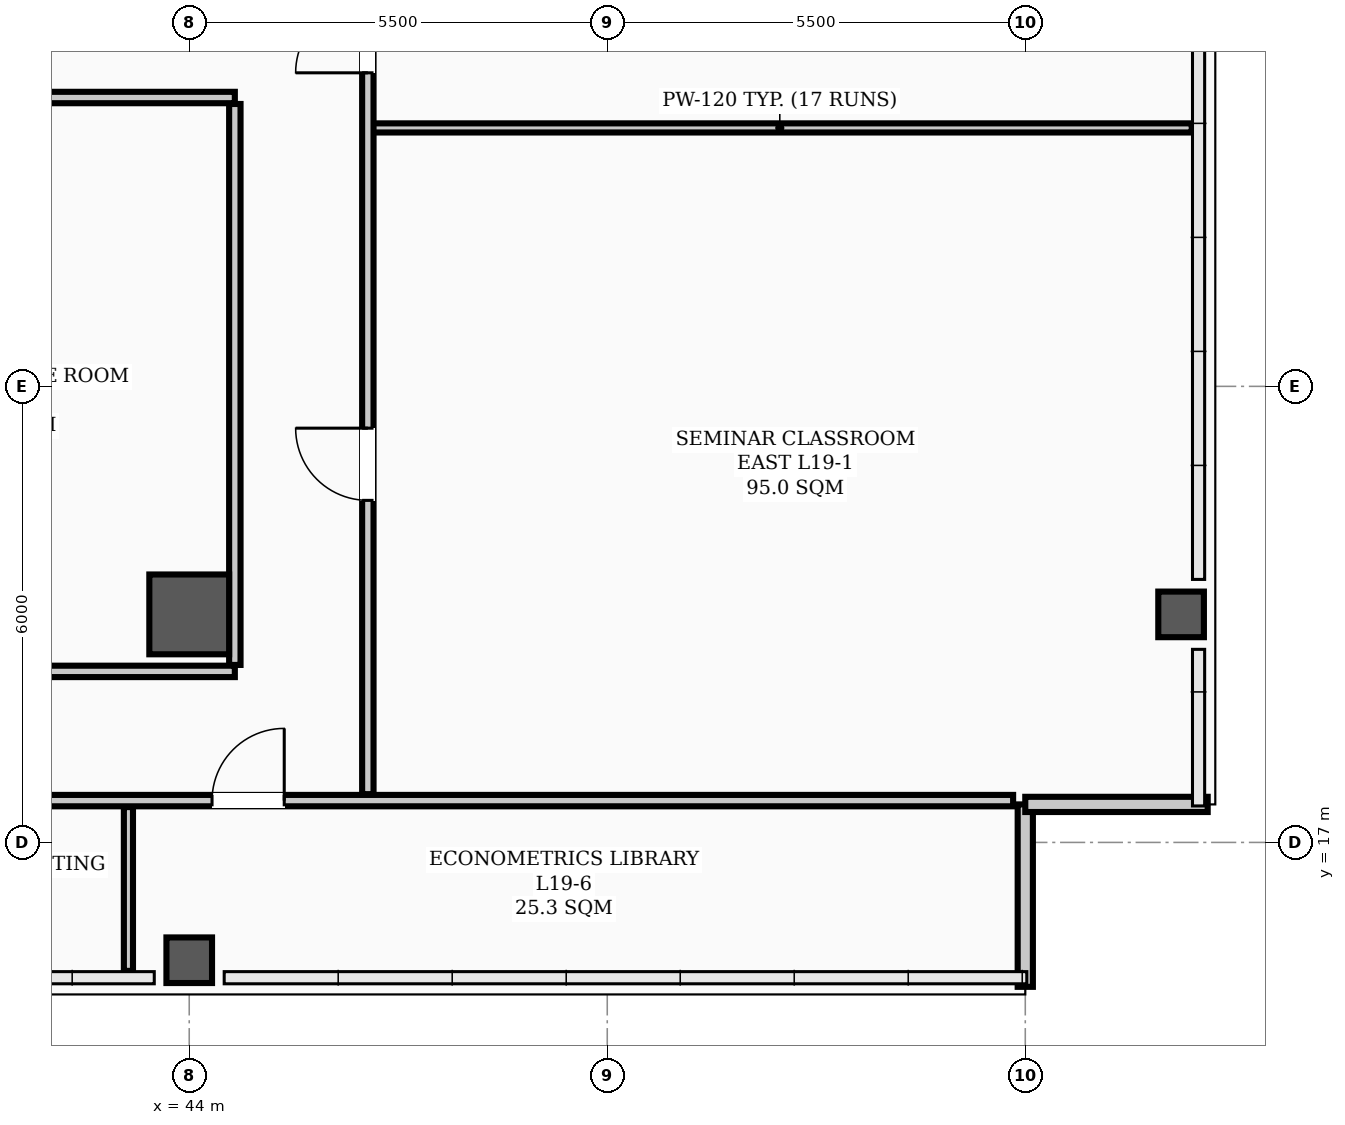
"""IFC4 building model, lengths in metres.
Left out: names, types, materials, properties, quantities, classifications, styles, units other than length and angle.
Written with IfcOpenShell. Run it as: python <this file> out.ifc"""

import sys

from ifc_helpers import new_model, si_unit, direction, frame, frame_2d, origin, origin_2d, place, context, subcontext, project, spatial, rectangle, hollow_rectangle, extrude, element, fill, save


model = new_model("IFC4")
c1 = context("Model", 3, precision=1e-05, world=origin(), true_north=direction((0.0, 1.0)))
c2 = subcontext(c1, "Body", "Model", "MODEL_VIEW")
j1 = project(units=[si_unit("LENGTHUNIT", "METRE"), si_unit("PLANEANGLEUNIT", "RADIAN")], contexts=[c1])
p1 = place(None, origin())
s1 = spatial("IfcSite", under=j1, at=p1, CompositionType="ELEMENT")
p2 = place(p1, origin())
s2 = spatial("IfcBuilding", under=s1, at=p2, CompositionType="ELEMENT")
p3 = place(p2, frame((0.0, 0.0, 77.2)))
s3 = spatial("IfcBuildingStorey", under=s2, at=p3, CompositionType="ELEMENT", Elevation=77.2)
p4 = place(p3, frame((44.0, 20.0, 0.0), z_axis=(0.0, 0.0, 1.0), x_axis=(1.0, 0.0, 0.0)))
e1 = element("IfcColumn", 1, at=p4, inside=s3, PredefinedType="COLUMN", context=c2, shape_type="SweptSolid", body=[
    extrude(hollow_rectangle(XDim=1.05, YDim=1.05, WallThickness=0.038, InnerFilletRadius=0.019, OuterFilletRadius=0.057, at=origin_2d()), origin(), (0.0, 0.0, 1.0), 3.9),
])
for number, where, z_axis, x_axis in (
    (2, (44.0, 15.45, 0.0), (0.0, 0.0, 1.0), (1.0, 0.0, 0.0)),
    (3, (57.05, 20.0, 0.0), (0.0, 0.0, 1.0), (1.0, 0.0, 0.0)),
):
    element("IfcColumn", number, at=place(p3, frame(where, z_axis=z_axis, x_axis=x_axis)), inside=s3, PredefinedType="COLUMN", context=c2, shape_type="SweptSolid", body=[
        extrude(hollow_rectangle(XDim=0.6, YDim=0.6, WallThickness=0.026, InnerFilletRadius=0.013, OuterFilletRadius=0.039, at=origin_2d()), origin(), (0.0, 0.0, 1.0), 3.9),
    ])
for number, where, z_axis, x_axis in (
    (4, (55.0, 15.1, 0.0), (0.0, 0.0, 1.0), (0.0, 1.0, 0.0)),
    (5, (55.0, 17.5, 0.0), (0.0, 0.0, 1.0), (1.0, 0.0, 0.0)),
):
    element("IfcWall", number, at=place(p3, frame(where, z_axis=z_axis, x_axis=x_axis)), inside=s3, PredefinedType="PARAPET", context=c2, shape_type="SweptSolid", body=[
        extrude(rectangle(XDim=2.4, YDim=0.2, at=frame_2d((1.2, 0.0))), origin(), (0.0, 0.0, 1.0), 1.2),
    ])
p5 = place(p3, frame((12.9, 26.8, 0.0), z_axis=(0.0, 0.0, 1.0), x_axis=(1.0, 0.0, 0.0)))
e6 = element("IfcWall", 6, at=p5, inside=s3, PredefinedType="PARTITIONING", context=c2, shape_type="SweptSolid", body=[
    extrude(rectangle(XDim=31.7, YDim=0.15, at=frame_2d((15.85, 0.0))), origin(), (0.0, 0.0, 1.0), 2.24),
])
p6 = place(p5, frame((13.6, 0.0, 0.0)))
e7 = element("IfcOpeningElement", 7, at=p6, cuts=e6, PredefinedType="OPENING", context=c2, shape_type="SweptSolid", body=[
    extrude(rectangle(XDim=1.6, YDim=2.08, at=frame_2d((0.8, 1.04))), frame((0.0, 0.085, 0.0), z_axis=(0.0, -1.0, 0.0), x_axis=(1.0, 0.0, 0.0)), (0.0, 0.0, 1.0), 0.17),
])
p7 = place(p5, frame((1.875, 0.0, 0.0)))
e8 = element("IfcOpeningElement", 8, at=p7, cuts=e6, PredefinedType="OPENING", context=c2, shape_type="SweptSolid", body=[
    extrude(rectangle(XDim=0.95, YDim=2.08, at=frame_2d((0.475, 1.04))), frame((0.0, 0.085, 0.0), z_axis=(0.0, -1.0, 0.0), x_axis=(1.0, 0.0, 0.0)), (0.0, 0.0, 1.0), 0.17),
])
p8 = place(p5, frame((6.425, 0.0, 0.0)))
e9 = element("IfcOpeningElement", 9, at=p8, cuts=e6, PredefinedType="OPENING", context=c2, shape_type="SweptSolid", body=[
    extrude(rectangle(XDim=0.95, YDim=2.08, at=frame_2d((0.475, 1.04))), frame((0.0, 0.085, 0.0), z_axis=(0.0, -1.0, 0.0), x_axis=(1.0, 0.0, 0.0)), (0.0, 0.0, 1.0), 0.17),
])
p9 = place(p5, frame((10.725, 0.0, 0.0)))
e10 = element("IfcOpeningElement", 10, at=p9, cuts=e6, PredefinedType="OPENING", context=c2, shape_type="SweptSolid", body=[
    extrude(rectangle(XDim=0.95, YDim=2.08, at=frame_2d((0.475, 1.04))), frame((0.0, 0.085, 0.0), z_axis=(0.0, -1.0, 0.0), x_axis=(1.0, 0.0, 0.0)), (0.0, 0.0, 1.0), 0.17),
])
p10 = place(p5, frame((16.075, 0.0, 0.0)))
e11 = element("IfcOpeningElement", 11, at=p10, cuts=e6, PredefinedType="OPENING", context=c2, shape_type="SweptSolid", body=[
    extrude(rectangle(XDim=0.95, YDim=2.08, at=frame_2d((0.475, 1.04))), frame((0.0, 0.085, 0.0), z_axis=(0.0, -1.0, 0.0), x_axis=(1.0, 0.0, 0.0)), (0.0, 0.0, 1.0), 0.17),
])
p11 = place(p5, frame((22.225, 0.0, 0.0)))
e12 = element("IfcOpeningElement", 12, at=p11, cuts=e6, PredefinedType="OPENING", context=c2, shape_type="SweptSolid", body=[
    extrude(rectangle(XDim=0.95, YDim=2.08, at=frame_2d((0.475, 1.04))), frame((0.0, 0.085, 0.0), z_axis=(0.0, -1.0, 0.0), x_axis=(1.0, 0.0, 0.0)), (0.0, 0.0, 1.0), 0.17),
])
p12 = place(p5, frame((28.225, 0.0, 0.0)))
e13 = element("IfcOpeningElement", 13, at=p12, cuts=e6, PredefinedType="OPENING", context=c2, shape_type="SweptSolid", body=[
    extrude(rectangle(XDim=0.95, YDim=2.08, at=frame_2d((0.475, 1.04))), frame((0.0, 0.085, 0.0), z_axis=(0.0, -1.0, 0.0), x_axis=(1.0, 0.0, 0.0)), (0.0, 0.0, 1.0), 0.17),
])
p13 = place(p3, frame((10.16, 17.55, 0.0), z_axis=(0.0, 0.0, 1.0), x_axis=(1.0, 0.0, 0.0)))
e14 = element("IfcWall", 14, at=p13, inside=s3, PredefinedType="PARTITIONING", context=c2, shape_type="SweptSolid", body=[
    extrude(rectangle(XDim=44.68, YDim=0.15, at=frame_2d((22.34, 0.0))), origin(), (0.0, 0.0, 1.0), 2.24),
])
p14 = place(p13, frame((5.465, 0.0, 0.0)))
e15 = element("IfcOpeningElement", 15, at=p14, cuts=e14, PredefinedType="OPENING", context=c2, shape_type="SweptSolid", body=[
    extrude(rectangle(XDim=0.95, YDim=2.08, at=frame_2d((0.475, 1.04))), frame((0.0, 0.085, 0.0), z_axis=(0.0, -1.0, 0.0), x_axis=(1.0, 0.0, 0.0)), (0.0, 0.0, 1.0), 0.17),
])
p15 = place(p13, frame((11.465, 0.0, 0.0)))
e16 = element("IfcOpeningElement", 16, at=p15, cuts=e14, PredefinedType="OPENING", context=c2, shape_type="SweptSolid", body=[
    extrude(rectangle(XDim=0.95, YDim=2.08, at=frame_2d((0.475, 1.04))), frame((0.0, 0.085, 0.0), z_axis=(0.0, -1.0, 0.0), x_axis=(1.0, 0.0, 0.0)), (0.0, 0.0, 1.0), 0.17),
])
p16 = place(p13, frame((28.565, 0.0, 0.0)))
e17 = element("IfcOpeningElement", 17, at=p16, cuts=e14, PredefinedType="OPENING", context=c2, shape_type="SweptSolid", body=[
    extrude(rectangle(XDim=0.95, YDim=2.08, at=frame_2d((0.475, 1.04))), frame((0.0, 0.085, 0.0), z_axis=(0.0, -1.0, 0.0), x_axis=(1.0, 0.0, 0.0)), (0.0, 0.0, 1.0), 0.17),
])
p17 = place(p13, frame((34.14, 0.0, 0.0)))
e18 = element("IfcOpeningElement", 18, at=p17, cuts=e14, PredefinedType="OPENING", context=c2, shape_type="SweptSolid", body=[
    extrude(rectangle(XDim=0.95, YDim=2.08, at=frame_2d((0.475, 1.04))), frame((0.0, 0.085, 0.0), z_axis=(0.0, -1.0, 0.0), x_axis=(1.0, 0.0, 0.0)), (0.0, 0.0, 1.0), 0.17),
])
p18 = place(p3, frame((28.4, 19.25, 0.0), z_axis=(0.0, 0.0, 1.0), x_axis=(1.0, 0.0, 0.0)))
e19 = element("IfcWall", 19, at=p18, inside=s3, PredefinedType="PARTITIONING", context=c2, shape_type="SweptSolid", body=[
    extrude(rectangle(XDim=16.2, YDim=0.15, at=frame_2d((8.1, 0.0))), origin(), (0.0, 0.0, 1.0), 2.24),
])
p19 = place(p3, frame((46.35, 26.4, 0.0), z_axis=(0.0, 0.0, 1.0), x_axis=(1.0, 0.0, 0.0)))
e20 = element("IfcWall", 20, at=p19, inside=s3, PredefinedType="PARTITIONING", context=c2, shape_type="SweptSolid", body=[
    extrude(rectangle(XDim=10.84, YDim=0.12, at=frame_2d((5.42, 0.0))), origin(), (0.0, 0.0, 1.0), 2.24),
])
p20 = place(p3, frame((46.35, 17.635, 0.0), z_axis=(0.0, 0.0, 1.0), x_axis=(0.0, 1.0, 0.0)))
e21 = element("IfcWall", 21, at=p20, inside=s3, PredefinedType="PARTITIONING", context=c2, shape_type="SweptSolid", body=[
    extrude(rectangle(XDim=22.53, YDim=0.15, at=frame_2d((11.265, 0.0))), origin(), (0.0, 0.0, 1.0), 2.24),
])
p21 = place(p20, frame((3.865, 0.0, 0.0)))
e22 = element("IfcOpeningElement", 22, at=p21, cuts=e21, PredefinedType="OPENING", context=c2, shape_type="SweptSolid", body=[
    extrude(rectangle(XDim=0.95, YDim=2.08, at=frame_2d((0.475, 1.04))), frame((0.0, 0.085, 0.0), z_axis=(0.0, -1.0, 0.0), x_axis=(1.0, 0.0, 0.0)), (0.0, 0.0, 1.0), 0.17),
])
p22 = place(p20, frame((9.49, 0.0, 0.0)))
e23 = element("IfcOpeningElement", 23, at=p22, cuts=e21, PredefinedType="OPENING", context=c2, shape_type="SweptSolid", body=[
    extrude(rectangle(XDim=0.95, YDim=2.08, at=frame_2d((0.475, 1.04))), frame((0.0, 0.085, 0.0), z_axis=(0.0, -1.0, 0.0), x_axis=(1.0, 0.0, 0.0)), (0.0, 0.0, 1.0), 0.17),
])
p23 = place(p20, frame((18.415, 0.0, 0.0)))
e24 = element("IfcOpeningElement", 24, at=p23, cuts=e21, PredefinedType="OPENING", context=c2, shape_type="SweptSolid", body=[
    extrude(rectangle(XDim=0.95, YDim=2.08, at=frame_2d((0.475, 1.04))), frame((0.0, 0.085, 0.0), z_axis=(0.0, -1.0, 0.0), x_axis=(1.0, 0.0, 0.0)), (0.0, 0.0, 1.0), 0.17),
])
p24 = place(p3, frame((44.6, 19.335, 0.0), z_axis=(0.0, 0.0, 1.0), x_axis=(0.0, 1.0, 0.0)))
e25 = element("IfcWall", 25, at=p24, inside=s3, PredefinedType="PARTITIONING", context=c2, shape_type="SweptSolid", body=[
    extrude(rectangle(XDim=7.38, YDim=0.15, at=frame_2d((3.69, 0.0))), origin(), (0.0, 0.0, 1.0), 2.24),
])
p25 = place(p3, frame((43.2, 15.31, 0.0), z_axis=(0.0, 0.0, 1.0), x_axis=(0.0, 1.0, 0.0)))
e26 = element("IfcWall", 26, at=p25, inside=s3, PredefinedType="PARTITIONING", context=c2, shape_type="SweptSolid", body=[
    extrude(rectangle(XDim=2.155, YDim=0.12, at=frame_2d((1.078, 0.0))), origin(), (0.0, 0.0, 1.0), 3.24),
])
p26 = place(p17, origin())
e27 = element("IfcDoor", 27, at=p26, inside=s3, OperationType="SINGLE_SWING_RIGHT", PredefinedType="DOOR", context=c2, shape_type="SweptSolid", body=[
    extrude(rectangle(XDim=0.95, YDim=2.08, at=frame_2d((0.475, 1.04))), frame((0.0, 0.025, 0.0), z_axis=(0.0, -1.0, 0.0), x_axis=(1.0, 0.0, 0.0)), (0.0, 0.0, 1.0), 0.05),
])
fill(e18, e27)
p27 = place(p21, origin())
e28 = element("IfcDoor", 28, at=p27, inside=s3, OperationType="SINGLE_SWING_RIGHT", PredefinedType="DOOR", context=c2, shape_type="SweptSolid", body=[
    extrude(rectangle(XDim=0.95, YDim=2.08, at=frame_2d((0.475, 1.04))), frame((0.0, 0.025, 0.0), z_axis=(0.0, -1.0, 0.0), x_axis=(1.0, 0.0, 0.0)), (0.0, 0.0, 1.0), 0.05),
])
fill(e22, e28)
p28 = place(p22, origin())
e29 = element("IfcDoor", 29, at=p28, inside=s3, OperationType="SINGLE_SWING_LEFT", PredefinedType="DOOR", context=c2, shape_type="SweptSolid", body=[
    extrude(rectangle(XDim=0.95, YDim=2.08, at=frame_2d((0.475, 1.04))), frame((0.0, 0.025, 0.0), z_axis=(0.0, -1.0, 0.0), x_axis=(1.0, 0.0, 0.0)), (0.0, 0.0, 1.0), 0.05),
])
fill(e23, e29)
save(model, sys.argv[1])
